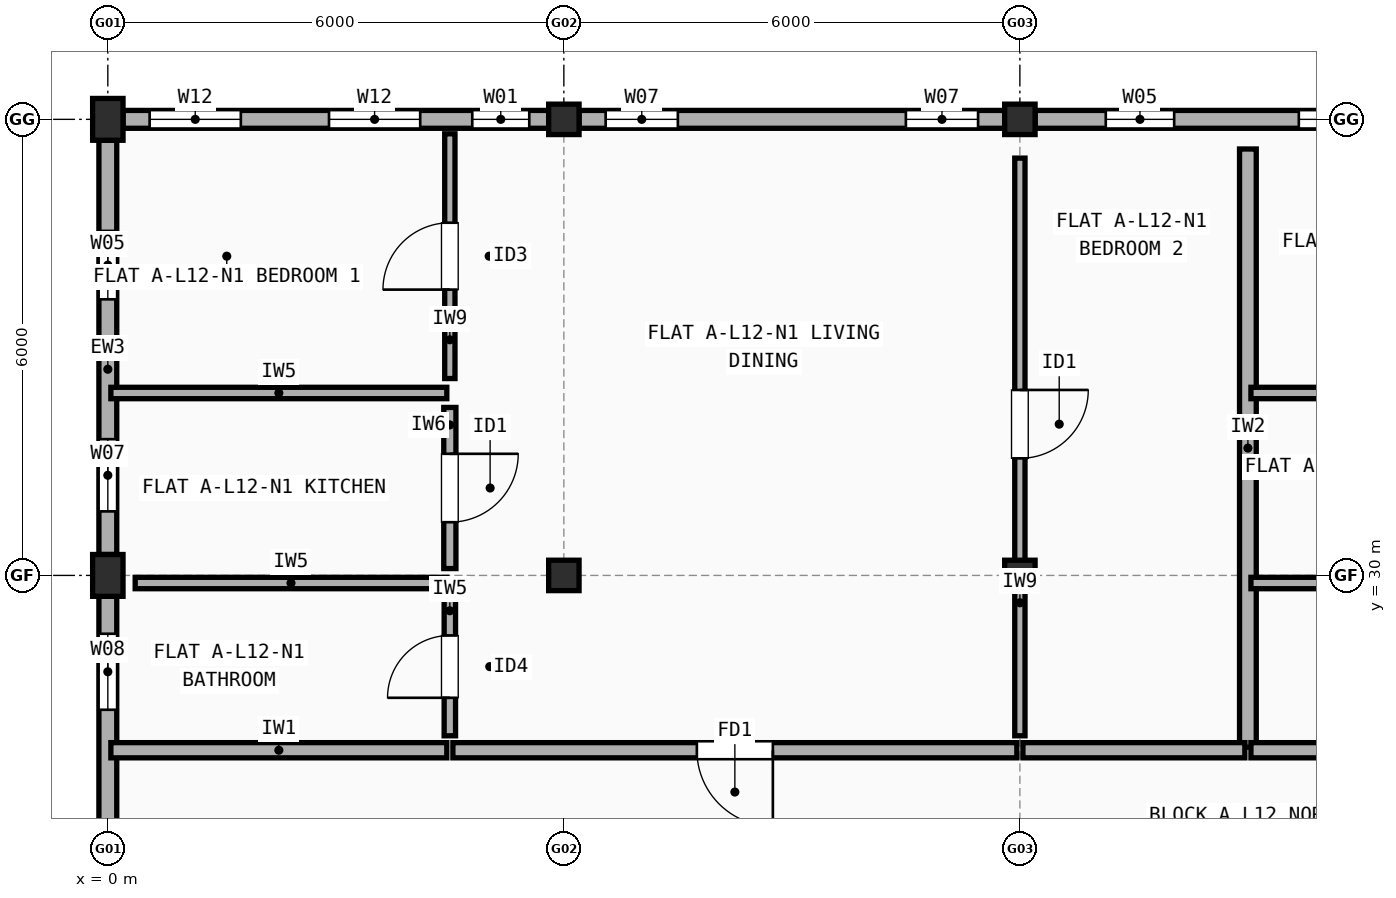
"""IFC4 building model, lengths in metres.
Left out: names, types, materials, properties, quantities, classifications, styles, units other than length and angle.
Written with IfcOpenShell. Run it as: python <this file> out.ifc"""

import sys

from ifc_helpers import new_model, si_unit, direction, frame, frame_2d, origin, origin_2d, place, context, subcontext, project, spatial, rectangle, extrude, element, fill, save


model = new_model("IFC4")
c1 = context("Model", 3, precision=1e-05, world=origin(), true_north=direction((0.0, 1.0)))
c2 = subcontext(c1, "Body", "Model", "MODEL_VIEW")
j1 = project(units=[si_unit("LENGTHUNIT", "METRE"), si_unit("PLANEANGLEUNIT", "RADIAN")], contexts=[c1])
p1 = place(None, origin())
s1 = spatial("IfcSite", under=j1, at=p1, CompositionType="ELEMENT")
p2 = place(p1, origin())
s2 = spatial("IfcBuilding", under=s1, at=p2, CompositionType="ELEMENT")
p3 = place(p2, frame((0.0, 0.0, 39.7)))
s3 = spatial("IfcBuildingStorey", under=s2, at=p3, CompositionType="ELEMENT", Elevation=39.7)
for number, where, z_axis, x_axis in (
    (1, (0.0, 30.0, 0.0), (0.0, 0.0, 1.0), (1.0, 0.0, 0.0)),
    (2, (0.0, 36.0, 0.0), (0.0, 0.0, 1.0), (1.0, 0.0, 0.0)),
):
    element("IfcColumn", number, at=place(p3, frame(where, z_axis=z_axis, x_axis=x_axis)), inside=s3, PredefinedType="COLUMN", context=c2, shape_type="SweptSolid", body=[
        extrude(rectangle(XDim=0.4, YDim=0.55, at=origin_2d()), origin(), (0.0, 0.0, 1.0), 3.0),
    ])
for number, where, z_axis, x_axis in (
    (3, (6.0, 30.0, 0.0), (0.0, 0.0, 1.0), (1.0, 0.0, 0.0)),
    (4, (6.0, 36.0, 0.0), (0.0, 0.0, 1.0), (1.0, 0.0, 0.0)),
    (5, (12.0, 30.0, 0.0), (0.0, 0.0, 1.0), (1.0, 0.0, 0.0)),
    (6, (12.0, 36.0, 0.0), (0.0, 0.0, 1.0), (1.0, 0.0, 0.0)),
):
    element("IfcColumn", number, at=place(p3, frame(where, z_axis=z_axis, x_axis=x_axis)), inside=s3, PredefinedType="COLUMN", context=c2, shape_type="SweptSolid", body=[
        extrude(rectangle(XDim=0.4, YDim=0.4, at=origin_2d()), origin(), (0.0, 0.0, 1.0), 3.0),
    ])
p4 = place(p3, frame((17.8, 36.0, 0.0), z_axis=(0.0, 0.0, 1.0), x_axis=(-1.0, 0.0, 0.0)))
e7 = element("IfcWall", 7, at=p4, inside=s3, PredefinedType="STANDARD", context=c2, shape_type="SweptSolid", body=[
    extrude(rectangle(XDim=5.6, YDim=0.235, at=frame_2d((2.8, 0.0))), origin(), (0.0, 0.0, 1.0), 2.482),
])
p5 = place(p4, frame((0.63, 0.0, 0.9)))
e8 = element("IfcOpeningElement", 8, at=p5, cuts=e7, PredefinedType="OPENING", context=c2, shape_type="SweptSolid", body=[
    extrude(rectangle(XDim=1.5, YDim=1.4, at=frame_2d((0.75, 0.7))), frame((0.0, 0.127, 0.0), z_axis=(0.0, -1.0, 0.0), x_axis=(1.0, 0.0, 0.0)), (0.0, 0.0, 1.0), 0.255),
])
p6 = place(p4, frame((3.77, 0.0, 0.9)))
e9 = element("IfcOpeningElement", 9, at=p6, cuts=e7, PredefinedType="OPENING", context=c2, shape_type="SweptSolid", body=[
    extrude(rectangle(XDim=0.9, YDim=1.4, at=frame_2d((0.45, 0.7))), frame((0.0, 0.127, 0.0), z_axis=(0.0, -1.0, 0.0), x_axis=(1.0, 0.0, 0.0)), (0.0, 0.0, 1.0), 0.255),
])
p7 = place(p3, frame((11.8, 36.0, 0.0), z_axis=(0.0, 0.0, 1.0), x_axis=(-1.0, 0.0, 0.0)))
e10 = element("IfcWall", 10, at=p7, inside=s3, PredefinedType="STANDARD", context=c2, shape_type="SweptSolid", body=[
    extrude(rectangle(XDim=5.6, YDim=0.235, at=frame_2d((2.8, 0.0))), origin(), (0.0, 0.0, 1.0), 2.482),
])
p8 = place(p7, frame((0.35, 0.0, 0.9)))
e11 = element("IfcOpeningElement", 11, at=p8, cuts=e10, PredefinedType="OPENING", context=c2, shape_type="SweptSolid", body=[
    extrude(rectangle(XDim=0.95, YDim=1.35, at=frame_2d((0.475, 0.675))), frame((0.0, 0.127, 0.0), z_axis=(0.0, -1.0, 0.0), x_axis=(1.0, 0.0, 0.0)), (0.0, 0.0, 1.0), 0.255),
])
p9 = place(p7, frame((4.3, 0.0, 0.9)))
e12 = element("IfcOpeningElement", 12, at=p9, cuts=e10, PredefinedType="OPENING", context=c2, shape_type="SweptSolid", body=[
    extrude(rectangle(XDim=0.95, YDim=1.35, at=frame_2d((0.475, 0.675))), frame((0.0, 0.127, 0.0), z_axis=(0.0, -1.0, 0.0), x_axis=(1.0, 0.0, 0.0)), (0.0, 0.0, 1.0), 0.255),
])
p10 = place(p3, frame((5.8, 36.0, 0.0), z_axis=(0.0, 0.0, 1.0), x_axis=(-1.0, 0.0, 0.0)))
e13 = element("IfcWall", 13, at=p10, inside=s3, PredefinedType="STANDARD", context=c2, shape_type="SweptSolid", body=[
    extrude(rectangle(XDim=5.6, YDim=0.235, at=frame_2d((2.8, 0.0))), origin(), (0.0, 0.0, 1.0), 2.482),
])
p11 = place(p10, frame((0.255, 0.0, 0.9)))
e14 = element("IfcOpeningElement", 14, at=p11, cuts=e13, PredefinedType="OPENING", context=c2, shape_type="SweptSolid", body=[
    extrude(rectangle(XDim=0.75, YDim=1.15, at=frame_2d((0.375, 0.575))), frame((0.0, 0.127, 0.0), z_axis=(0.0, -1.0, 0.0), x_axis=(1.0, 0.0, 0.0)), (0.0, 0.0, 1.0), 0.255),
])
p12 = place(p10, frame((1.69, 0.0, 0.9)))
e15 = element("IfcOpeningElement", 15, at=p12, cuts=e13, PredefinedType="OPENING", context=c2, shape_type="SweptSolid", body=[
    extrude(rectangle(XDim=1.2, YDim=1.35, at=frame_2d((0.6, 0.675))), frame((0.0, 0.127, 0.0), z_axis=(0.0, -1.0, 0.0), x_axis=(1.0, 0.0, 0.0)), (0.0, 0.0, 1.0), 0.255),
])
p13 = place(p10, frame((4.05, 0.0, 0.9)))
e16 = element("IfcOpeningElement", 16, at=p13, cuts=e13, PredefinedType="OPENING", context=c2, shape_type="SweptSolid", body=[
    extrude(rectangle(XDim=1.2, YDim=1.35, at=frame_2d((0.6, 0.675))), frame((0.0, 0.127, 0.0), z_axis=(0.0, -1.0, 0.0), x_axis=(1.0, 0.0, 0.0)), (0.0, 0.0, 1.0), 0.255),
])
p14 = place(p3, frame((0.0, 35.725, 0.0), z_axis=(0.0, 0.0, 1.0), x_axis=(0.0, -1.0, 0.0)))
e17 = element("IfcWall", 17, at=p14, inside=s3, PredefinedType="STANDARD", context=c2, shape_type="SweptSolid", body=[
    extrude(rectangle(XDim=5.45, YDim=0.235, at=frame_2d((2.725, 0.0))), origin(), (0.0, 0.0, 1.0), 2.482),
])
p15 = place(p14, frame((1.192, 0.0, 0.9)))
e18 = element("IfcOpeningElement", 18, at=p15, cuts=e17, PredefinedType="OPENING", context=c2, shape_type="SweptSolid", body=[
    extrude(rectangle(XDim=0.9, YDim=1.4, at=frame_2d((0.45, 0.7))), frame((0.0, 0.127, 0.0), z_axis=(0.0, -1.0, 0.0), x_axis=(1.0, 0.0, 0.0)), (0.0, 0.0, 1.0), 0.255),
])
p16 = place(p14, frame((3.933, 0.0, 0.9)))
e19 = element("IfcOpeningElement", 19, at=p16, cuts=e17, PredefinedType="OPENING", context=c2, shape_type="SweptSolid", body=[
    extrude(rectangle(XDim=0.95, YDim=1.35, at=frame_2d((0.475, 0.675))), frame((0.0, 0.127, 0.0), z_axis=(0.0, -1.0, 0.0), x_axis=(1.0, 0.0, 0.0)), (0.0, 0.0, 1.0), 0.255),
])
p17 = place(p3, frame((0.0, 29.725, 0.0), z_axis=(0.0, 0.0, 1.0), x_axis=(0.0, -1.0, 0.0)))
e20 = element("IfcWall", 20, at=p17, inside=s3, PredefinedType="STANDARD", context=c2, shape_type="SweptSolid", body=[
    extrude(rectangle(XDim=5.45, YDim=0.235, at=frame_2d((2.725, 0.0))), origin(), (0.0, 0.0, 1.0), 2.482),
])
p18 = place(p17, frame((0.492, 0.0, 0.9)))
e21 = element("IfcOpeningElement", 21, at=p18, cuts=e20, PredefinedType="OPENING", context=c2, shape_type="SweptSolid", body=[
    extrude(rectangle(XDim=1.0, YDim=1.4, at=frame_2d((0.5, 0.7))), frame((0.0, 0.127, 0.0), z_axis=(0.0, -1.0, 0.0), x_axis=(1.0, 0.0, 0.0)), (0.0, 0.0, 1.0), 0.255),
])
p19 = place(p17, frame((3.232, 0.0, 0.9)))
e22 = element("IfcOpeningElement", 22, at=p19, cuts=e20, PredefinedType="OPENING", context=c2, shape_type="SweptSolid", body=[
    extrude(rectangle(XDim=1.05, YDim=1.35, at=frame_2d((0.525, 0.675))), frame((0.0, 0.127, 0.0), z_axis=(0.0, -1.0, 0.0), x_axis=(1.0, 0.0, 0.0)), (0.0, 0.0, 1.0), 0.255),
])
p20 = place(p3, frame((15.0, 27.74, 0.0), z_axis=(0.0, 0.0, 1.0), x_axis=(0.0, 1.0, 0.0)))
e23 = element("IfcWall", 23, at=p20, inside=s3, PredefinedType="SOLIDWALL", context=c2, shape_type="SweptSolid", body=[
    extrude(rectangle(XDim=7.87, YDim=0.22, at=frame_2d((3.935, 0.0))), origin(), (0.0, 0.0, 1.0), 2.532),
])
p21 = place(p3, frame((0.04, 27.7, 0.0), z_axis=(0.0, 0.0, 1.0), x_axis=(1.0, 0.0, 0.0)))
e24 = element("IfcWall", 24, at=p21, inside=s3, PredefinedType="SOLIDWALL", context=c2, shape_type="SweptSolid", body=[
    extrude(rectangle(XDim=4.42, YDim=0.2, at=frame_2d((2.21, 0.0))), origin(), (0.0, 0.0, 1.0), 2.482),
])
p22 = place(p3, frame((4.54, 27.7, 0.0), z_axis=(0.0, 0.0, 1.0), x_axis=(1.0, 0.0, 0.0)))
e25 = element("IfcWall", 25, at=p22, inside=s3, PredefinedType="SOLIDWALL", context=c2, shape_type="SweptSolid", body=[
    extrude(rectangle(XDim=7.42, YDim=0.2, at=frame_2d((3.71, 0.0))), origin(), (0.0, 0.0, 1.0), 2.508),
])
p23 = place(p22, frame((3.21, 0.0, 0.0)))
e26 = element("IfcOpeningElement", 26, at=p23, cuts=e25, PredefinedType="OPENING", context=c2, shape_type="SweptSolid", body=[
    extrude(rectangle(XDim=1.0, YDim=2.15, at=frame_2d((0.5, 1.075))), frame((0.0, 0.11, 0.0), z_axis=(0.0, -1.0, 0.0), x_axis=(1.0, 0.0, 0.0)), (0.0, 0.0, 1.0), 0.22),
])
p24 = place(p3, frame((4.5, 32.59, 0.0), z_axis=(0.0, 0.0, 1.0), x_axis=(0.0, 1.0, 0.0)))
e27 = element("IfcWall", 27, at=p24, inside=s3, PredefinedType="PARTITIONING", context=c2, shape_type="SweptSolid", body=[
    extrude(rectangle(XDim=3.22, YDim=0.135, at=frame_2d((1.61, 0.0))), origin(), (0.0, 0.0, 1.0), 3.0),
])
p25 = place(p24, frame((1.17, 0.0, 0.0)))
e28 = element("IfcOpeningElement", 28, at=p25, cuts=e27, PredefinedType="OPENING", context=c2, shape_type="SweptSolid", body=[
    extrude(rectangle(XDim=0.88, YDim=2.1, at=frame_2d((0.44, 1.05))), frame((0.0, 0.077, 0.0), z_axis=(0.0, -1.0, 0.0), x_axis=(1.0, 0.0, 0.0)), (0.0, 0.0, 1.0), 0.155),
])
p26 = place(p3, frame((4.5, 30.09, 0.0), z_axis=(0.0, 0.0, 1.0), x_axis=(0.0, 1.0, 0.0)))
e29 = element("IfcWall", 29, at=p26, inside=s3, PredefinedType="PLUMBINGWALL", context=c2, shape_type="SweptSolid", body=[
    extrude(rectangle(XDim=2.12, YDim=0.16, at=frame_2d((1.06, 0.0))), origin(), (0.0, 0.0, 1.0), 2.532),
])
p27 = place(p26, frame((0.61, 0.0, 0.0)))
e30 = element("IfcOpeningElement", 30, at=p27, cuts=e29, PredefinedType="OPENING", context=c2, shape_type="SweptSolid", body=[
    extrude(rectangle(XDim=0.9, YDim=2.1, at=frame_2d((0.45, 1.05))), frame((0.0, 0.09, 0.0), z_axis=(0.0, -1.0, 0.0), x_axis=(1.0, 0.0, 0.0)), (0.0, 0.0, 1.0), 0.18),
])
p28 = place(p3, frame((4.5, 27.89, 0.0), z_axis=(0.0, 0.0, 1.0), x_axis=(0.0, 1.0, 0.0)))
e31 = element("IfcWall", 31, at=p28, inside=s3, PredefinedType="PARTITIONING", context=c2, shape_type="SweptSolid", body=[
    extrude(rectangle(XDim=1.82, YDim=0.15, at=frame_2d((0.91, 0.0))), origin(), (0.0, 0.0, 1.0), 3.0),
])
p29 = place(p28, frame((0.5, 0.0, 0.0)))
e32 = element("IfcOpeningElement", 32, at=p29, cuts=e31, PredefinedType="OPENING", context=c2, shape_type="SweptSolid", body=[
    extrude(rectangle(XDim=0.82, YDim=2.08, at=frame_2d((0.41, 1.04))), frame((0.0, 0.085, 0.0), z_axis=(0.0, -1.0, 0.0), x_axis=(1.0, 0.0, 0.0)), (0.0, 0.0, 1.0), 0.17),
])
p30 = place(p3, frame((0.04, 32.4, 0.0), z_axis=(0.0, 0.0, 1.0), x_axis=(1.0, 0.0, 0.0)))
e33 = element("IfcWall", 33, at=p30, inside=s3, PredefinedType="PARTITIONING", context=c2, shape_type="SweptSolid", body=[
    extrude(rectangle(XDim=4.42, YDim=0.15, at=frame_2d((2.21, 0.0))), origin(), (0.0, 0.0, 1.0), 2.482),
])
p31 = place(p3, frame((0.36, 29.9, 0.0), z_axis=(0.0, 0.0, 1.0), x_axis=(1.0, 0.0, 0.0)))
e34 = element("IfcWall", 34, at=p31, inside=s3, PredefinedType="PARTITIONING", context=c2, shape_type="SweptSolid", body=[
    extrude(rectangle(XDim=4.1, YDim=0.15, at=frame_2d((2.05, 0.0))), origin(), (0.0, 0.0, 1.0), 2.532),
])
p32 = place(p3, frame((12.04, 27.7, 0.0), z_axis=(0.0, 0.0, 1.0), x_axis=(1.0, 0.0, 0.0)))
e35 = element("IfcWall", 35, at=p32, inside=s3, PredefinedType="SOLIDWALL", context=c2, shape_type="SweptSolid", body=[
    extrude(rectangle(XDim=2.92, YDim=0.2, at=frame_2d((1.46, 0.0))), origin(), (0.0, 0.0, 1.0), 2.508),
])
p33 = place(p3, frame((12.0, 27.89, 0.0), z_axis=(0.0, 0.0, 1.0), x_axis=(0.0, 1.0, 0.0)))
e36 = element("IfcWall", 36, at=p33, inside=s3, PredefinedType="PARTITIONING", context=c2, shape_type="SweptSolid", body=[
    extrude(rectangle(XDim=7.6, YDim=0.135, at=frame_2d((3.8, 0.0))), origin(), (0.0, 0.0, 1.0), 2.508),
])
p34 = place(p33, frame((3.65, 0.0, 0.0)))
e37 = element("IfcOpeningElement", 37, at=p34, cuts=e36, PredefinedType="OPENING", context=c2, shape_type="SweptSolid", body=[
    extrude(rectangle(XDim=0.9, YDim=2.1, at=frame_2d((0.45, 1.05))), frame((0.0, 0.077, 0.0), z_axis=(0.0, -1.0, 0.0), x_axis=(1.0, 0.0, 0.0)), (0.0, 0.0, 1.0), 0.155),
])
p35 = place(p3, frame((15.04, 27.7, 0.0), z_axis=(0.0, 0.0, 1.0), x_axis=(1.0, 0.0, 0.0)))
e38 = element("IfcWall", 38, at=p35, inside=s3, PredefinedType="SOLIDWALL", context=c2, shape_type="SweptSolid", body=[
    extrude(rectangle(XDim=4.42, YDim=0.2, at=frame_2d((2.21, 0.0))), origin(), (0.0, 0.0, 1.0), 3.0),
])
p36 = place(p3, frame((15.04, 32.4, 0.0), z_axis=(0.0, 0.0, 1.0), x_axis=(1.0, 0.0, 0.0)))
e39 = element("IfcWall", 39, at=p36, inside=s3, PredefinedType="PARTITIONING", context=c2, shape_type="SweptSolid", body=[
    extrude(rectangle(XDim=4.42, YDim=0.15, at=frame_2d((2.21, 0.0))), origin(), (0.0, 0.0, 1.0), 2.508),
])
p37 = place(p3, frame((15.04, 29.9, 0.0), z_axis=(0.0, 0.0, 1.0), x_axis=(1.0, 0.0, 0.0)))
e40 = element("IfcWall", 40, at=p37, inside=s3, PredefinedType="PARTITIONING", context=c2, shape_type="SweptSolid", body=[
    extrude(rectangle(XDim=4.42, YDim=0.15, at=frame_2d((2.21, 0.0))), origin(), (0.0, 0.0, 1.0), 2.532),
])
p38 = place(p5, origin())
e41 = element("IfcWindow", 41, at=p38, inside=s3, PartitioningType="SINGLE_PANEL", PredefinedType="WINDOW", context=c2, shape_type="SweptSolid", body=[
    extrude(rectangle(XDim=1.5, YDim=1.4, at=frame_2d((0.75, 0.7))), frame((0.0, 0.03, 0.0), z_axis=(0.0, -1.0, 0.0), x_axis=(1.0, 0.0, 0.0)), (0.0, 0.0, 1.0), 0.06),
])
fill(e8, e41)
p39 = place(p6, origin())
e42 = element("IfcWindow", 42, at=p39, inside=s3, PartitioningType="SINGLE_PANEL", PredefinedType="WINDOW", context=c2, shape_type="SweptSolid", body=[
    extrude(rectangle(XDim=0.9, YDim=1.4, at=frame_2d((0.45, 0.7))), frame((0.0, 0.03, 0.0), z_axis=(0.0, -1.0, 0.0), x_axis=(1.0, 0.0, 0.0)), (0.0, 0.0, 1.0), 0.06),
])
fill(e9, e42)
p40 = place(p8, origin())
e43 = element("IfcWindow", 43, at=p40, inside=s3, PartitioningType="SINGLE_PANEL", PredefinedType="WINDOW", context=c2, shape_type="SweptSolid", body=[
    extrude(rectangle(XDim=0.95, YDim=1.35, at=frame_2d((0.475, 0.675))), frame((0.0, 0.03, 0.0), z_axis=(0.0, -1.0, 0.0), x_axis=(1.0, 0.0, 0.0)), (0.0, 0.0, 1.0), 0.06),
])
fill(e11, e43)
p41 = place(p9, origin())
e44 = element("IfcWindow", 44, at=p41, inside=s3, PartitioningType="SINGLE_PANEL", PredefinedType="WINDOW", context=c2, shape_type="SweptSolid", body=[
    extrude(rectangle(XDim=0.95, YDim=1.35, at=frame_2d((0.475, 0.675))), frame((0.0, 0.03, 0.0), z_axis=(0.0, -1.0, 0.0), x_axis=(1.0, 0.0, 0.0)), (0.0, 0.0, 1.0), 0.06),
])
fill(e12, e44)
p42 = place(p11, origin())
e45 = element("IfcWindow", 45, at=p42, inside=s3, PartitioningType="SINGLE_PANEL", PredefinedType="WINDOW", context=c2, shape_type="SweptSolid", body=[
    extrude(rectangle(XDim=0.75, YDim=1.15, at=frame_2d((0.375, 0.575))), frame((0.0, 0.03, 0.0), z_axis=(0.0, -1.0, 0.0), x_axis=(1.0, 0.0, 0.0)), (0.0, 0.0, 1.0), 0.06),
])
fill(e14, e45)
p43 = place(p12, origin())
e46 = element("IfcWindow", 46, at=p43, inside=s3, PartitioningType="SINGLE_PANEL", PredefinedType="WINDOW", context=c2, shape_type="SweptSolid", body=[
    extrude(rectangle(XDim=1.2, YDim=1.35, at=frame_2d((0.6, 0.675))), frame((0.0, 0.03, 0.0), z_axis=(0.0, -1.0, 0.0), x_axis=(1.0, 0.0, 0.0)), (0.0, 0.0, 1.0), 0.06),
])
fill(e15, e46)
p44 = place(p13, origin())
e47 = element("IfcWindow", 47, at=p44, inside=s3, PartitioningType="SINGLE_PANEL", PredefinedType="WINDOW", context=c2, shape_type="SweptSolid", body=[
    extrude(rectangle(XDim=1.2, YDim=1.35, at=frame_2d((0.6, 0.675))), frame((0.0, 0.03, 0.0), z_axis=(0.0, -1.0, 0.0), x_axis=(1.0, 0.0, 0.0)), (0.0, 0.0, 1.0), 0.06),
])
fill(e16, e47)
p45 = place(p15, origin())
e48 = element("IfcWindow", 48, at=p45, inside=s3, PartitioningType="SINGLE_PANEL", PredefinedType="WINDOW", context=c2, shape_type="SweptSolid", body=[
    extrude(rectangle(XDim=0.9, YDim=1.4, at=frame_2d((0.45, 0.7))), frame((0.0, 0.03, 0.0), z_axis=(0.0, -1.0, 0.0), x_axis=(1.0, 0.0, 0.0)), (0.0, 0.0, 1.0), 0.06),
])
fill(e18, e48)
p46 = place(p16, origin())
e49 = element("IfcWindow", 49, at=p46, inside=s3, PartitioningType="SINGLE_PANEL", PredefinedType="WINDOW", context=c2, shape_type="SweptSolid", body=[
    extrude(rectangle(XDim=0.95, YDim=1.35, at=frame_2d((0.475, 0.675))), frame((0.0, 0.03, 0.0), z_axis=(0.0, -1.0, 0.0), x_axis=(1.0, 0.0, 0.0)), (0.0, 0.0, 1.0), 0.06),
])
fill(e19, e49)
p47 = place(p18, origin())
e50 = element("IfcWindow", 50, at=p47, inside=s3, PartitioningType="SINGLE_PANEL", PredefinedType="WINDOW", context=c2, shape_type="SweptSolid", body=[
    extrude(rectangle(XDim=1.0, YDim=1.4, at=frame_2d((0.5, 0.7))), frame((0.0, 0.03, 0.0), z_axis=(0.0, -1.0, 0.0), x_axis=(1.0, 0.0, 0.0)), (0.0, 0.0, 1.0), 0.06),
])
fill(e21, e50)
p48 = place(p23, origin())
e51 = element("IfcDoor", 51, at=p48, inside=s3, OperationType="SINGLE_SWING_RIGHT", PredefinedType="DOOR", context=c2, shape_type="SweptSolid", body=[
    extrude(rectangle(XDim=1.0, YDim=2.15, at=frame_2d((0.5, 1.075))), frame((0.0, 0.025, 0.0), z_axis=(0.0, -1.0, 0.0), x_axis=(1.0, 0.0, 0.0)), (0.0, 0.0, 1.0), 0.05),
])
fill(e26, e51)
p49 = place(p25, origin())
e52 = element("IfcDoor", 52, at=p49, inside=s3, OperationType="SINGLE_SWING_LEFT", PredefinedType="DOOR", context=c2, shape_type="SweptSolid", body=[
    extrude(rectangle(XDim=0.88, YDim=2.1, at=frame_2d((0.44, 1.05))), frame((0.0, 0.025, 0.0), z_axis=(0.0, -1.0, 0.0), x_axis=(1.0, 0.0, 0.0)), (0.0, 0.0, 1.0), 0.05),
])
fill(e28, e52)
p50 = place(p27, origin())
e53 = element("IfcDoor", 53, at=p50, inside=s3, OperationType="SINGLE_SWING_RIGHT", PredefinedType="DOOR", context=c2, shape_type="SweptSolid", body=[
    extrude(rectangle(XDim=0.9, YDim=2.1, at=frame_2d((0.45, 1.05))), frame((0.0, 0.025, 0.0), z_axis=(0.0, -1.0, 0.0), x_axis=(1.0, 0.0, 0.0)), (0.0, 0.0, 1.0), 0.05),
])
fill(e30, e53)
p51 = place(p29, origin())
e54 = element("IfcDoor", 54, at=p51, inside=s3, OperationType="SINGLE_SWING_LEFT", PredefinedType="DOOR", context=c2, shape_type="SweptSolid", body=[
    extrude(rectangle(XDim=0.82, YDim=2.08, at=frame_2d((0.41, 1.04))), frame((0.0, 0.025, 0.0), z_axis=(0.0, -1.0, 0.0), x_axis=(1.0, 0.0, 0.0)), (0.0, 0.0, 1.0), 0.05),
])
fill(e32, e54)
p52 = place(p34, origin())
e55 = element("IfcDoor", 55, at=p52, inside=s3, OperationType="SINGLE_SWING_RIGHT", PredefinedType="DOOR", context=c2, shape_type="SweptSolid", body=[
    extrude(rectangle(XDim=0.9, YDim=2.1, at=frame_2d((0.45, 1.05))), frame((0.0, 0.025, 0.0), z_axis=(0.0, -1.0, 0.0), x_axis=(1.0, 0.0, 0.0)), (0.0, 0.0, 1.0), 0.05),
])
fill(e37, e55)
save(model, sys.argv[1])
